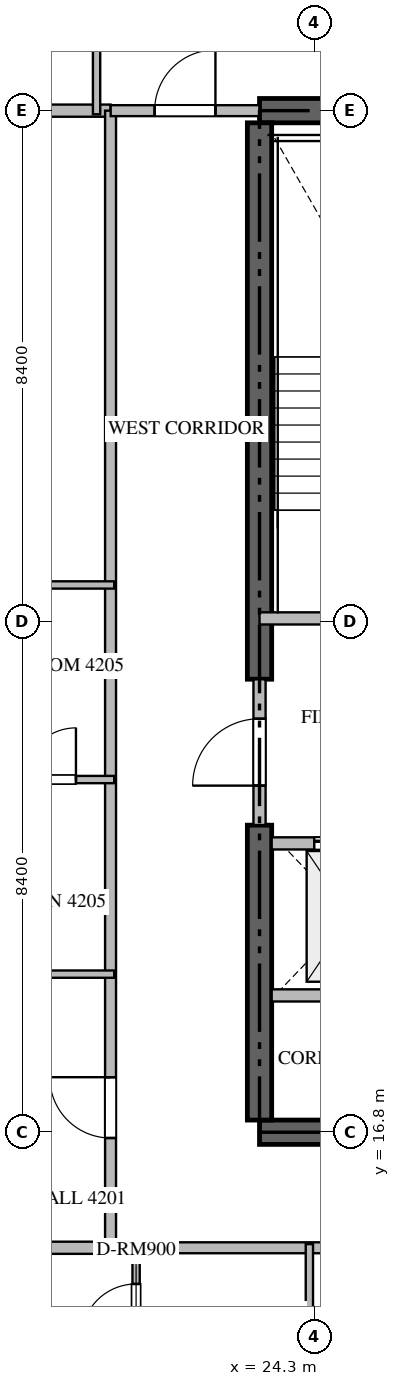
"""IFC4 building model, lengths in metres.
Left out: names, types, materials, properties, quantities, classifications, styles, units other than length and angle.
Written with IfcOpenShell. Run it as: python <this file> out.ifc"""

import sys

from ifc_helpers import new_model, si_unit, direction, frame, frame_2d, origin, place, context, subcontext, project, spatial, rectangle, extrude, source, transform, mapped, element, fill, save


model = new_model("IFC4")
c1 = context("Model", 3, precision=1e-05, world=origin(), true_north=direction((0.0, 1.0)))
c2 = subcontext(c1, "Body", "Model", "MODEL_VIEW")
j1 = project(units=[si_unit("LENGTHUNIT", "METRE"), si_unit("PLANEANGLEUNIT", "RADIAN")], contexts=[c1])
p1 = place(None, origin())
s1 = spatial("IfcSite", under=j1, at=p1, CompositionType="ELEMENT")
p2 = place(p1, origin())
s2 = spatial("IfcBuilding", under=s1, at=p2, CompositionType="ELEMENT")
p3 = place(p2, frame((0.0, 0.0, 168.9)))
s3 = spatial("IfcBuildingStorey", under=s2, at=p3, CompositionType="ELEMENT", Elevation=168.9)
for number, where, z_axis, x_axis in (
    (1, (23.4, 16.8, -0.26), (0.0, 0.0, 1.0), (1.0, 0.0, 0.0)),
    (2, (41.4, 33.6, -0.26), (0.0, 0.0, 1.0), (-1.0, 0.0, 0.0)),
):
    element("IfcWall", number, at=place(p3, frame(where, z_axis=z_axis, x_axis=x_axis)), inside=s3, PredefinedType="SHEAR", context=c2, shape_type="SweptSolid", body=[
        extrude(rectangle(XDim=18.0, YDim=0.4, at=frame_2d((9.0, 0.0))), origin(), (0.0, 0.0, 1.0), 3.748),
    ])
p4 = place(p3, frame((23.4, 17.0, -0.26), z_axis=(0.0, 0.0, 1.0), x_axis=(0.0, 1.0, 0.0)))
e3 = element("IfcWall", 3, at=p4, inside=s3, PredefinedType="SHEAR", context=c2, shape_type="SweptSolid", body=[
    extrude(rectangle(XDim=4.85, YDim=0.4, at=frame_2d((2.425, 0.0))), origin(), (0.0, 0.0, 1.0), 3.748),
])
p5 = place(p3, frame((23.4, 24.25, -0.26), z_axis=(0.0, 0.0, 1.0), x_axis=(0.0, 1.0, 0.0)))
e4 = element("IfcWall", 4, at=p5, inside=s3, PredefinedType="SHEAR", context=c2, shape_type="SweptSolid", body=[
    extrude(rectangle(XDim=9.15, YDim=0.4, at=frame_2d((4.575, 0.0))), origin(), (0.0, 0.0, 1.0), 3.748),
])
p6 = place(p3, frame((23.4, 25.25, 0.0), z_axis=(0.0, 0.0, 1.0), x_axis=(1.0, 0.0, 0.0)))
e5 = element("IfcWall", 5, at=p6, inside=s3, PredefinedType="STANDARD", context=c2, shape_type="SweptSolid", body=[
    extrude(rectangle(XDim=4.45, YDim=0.2, at=frame_2d((2.225, 0.0))), origin(), (0.0, 0.0, 1.0), 3.49),
])
p7 = place(p6, frame((1.65, 0.0, 0.0)))
e6 = element("IfcOpeningElement", 6, at=p7, cuts=e5, PredefinedType="OPENING", context=c2, shape_type="SweptSolid", body=[
    extrude(rectangle(XDim=1.1, YDim=2.15, at=frame_2d((0.55, 1.075))), frame((0.0, 0.11, 0.0), z_axis=(0.0, -1.0, 0.0), x_axis=(1.0, 0.0, 0.0)), (0.0, 0.0, 1.0), 0.22),
])
p8 = place(p3, frame((23.6, 21.55, 0.0), z_axis=(0.0, 0.0, 1.0), x_axis=(1.0, 0.0, 0.0)))
e7 = element("IfcWall", 7, at=p8, inside=s3, PredefinedType="STANDARD", context=c2, shape_type="SweptSolid", body=[
    extrude(rectangle(XDim=2.45, YDim=0.2, at=frame_2d((1.225, 0.0))), origin(), (0.0, 0.0, 1.0), 3.49),
])
p9 = place(p8, frame((0.7, 0.0, 0.0)))
e8 = element("IfcOpeningElement", 8, at=p9, cuts=e7, PredefinedType="OPENING", context=c2, shape_type="SweptSolid", body=[
    extrude(rectangle(XDim=1.2, YDim=2.2, at=frame_2d((0.6, 1.1))), frame((0.0, 0.11, 0.0), z_axis=(0.0, -1.0, 0.0), x_axis=(1.0, 0.0, 0.0)), (0.0, 0.0, 1.0), 0.22),
])
p10 = place(p3, frame((23.6, 19.05, 0.0), z_axis=(0.0, 0.0, 1.0), x_axis=(1.0, 0.0, 0.0)))
e9 = element("IfcWall", 9, at=p10, inside=s3, PredefinedType="STANDARD", context=c2, shape_type="SweptSolid", body=[
    extrude(rectangle(XDim=2.45, YDim=0.2, at=frame_2d((1.225, 0.0))), origin(), (0.0, 0.0, 1.0), 3.49),
])
p11 = place(p3, frame((23.4, 21.852, 0.0), z_axis=(0.0, 0.0, 1.0), x_axis=(0.0, 1.0, 0.0)))
e10 = element("IfcWall", 10, at=p11, inside=s3, PredefinedType="STANDARD", context=c2, shape_type="SweptSolid", body=[
    extrude(rectangle(XDim=2.396, YDim=0.2, at=frame_2d((1.198, 0.0))), origin(), (0.0, 0.0, 1.0), 3.49),
])
p12 = place(p11, frame((0.648, 0.0, 0.0)))
e11 = element("IfcOpeningElement", 11, at=p12, cuts=e10, PredefinedType="OPENING", context=c2, shape_type="SweptSolid", body=[
    extrude(rectangle(XDim=1.1, YDim=2.15, at=frame_2d((0.55, 1.075))), frame((0.0, 0.11, 0.0), z_axis=(0.0, -1.0, 0.0), x_axis=(1.0, 0.0, 0.0)), (0.0, 0.0, 1.0), 0.22),
])
for number, where, z_axis, x_axis in (
    (12, (7.882, 14.9, 0.0), (0.0, 0.0, 1.0), (1.0, 0.0, 0.0)),
    (13, (7.882, 33.6, 0.0), (0.0, 0.0, 1.0), (1.0, 0.0, 0.0)),
):
    element("IfcWall", number, at=place(p3, frame(where, z_axis=z_axis, x_axis=x_axis)), inside=s3, PredefinedType="PARTITIONING", context=c2, shape_type="SweptSolid", body=[
        extrude(rectangle(XDim=13.068, YDim=0.2, at=frame_2d((6.534, 0.0))), origin(), (0.0, 0.0, 1.0), 3.49),
    ])
p13 = place(p3, frame((20.952, 14.9, 0.0), z_axis=(0.0, 0.0, 1.0), x_axis=(1.0, 0.0, 0.0)))
e14 = element("IfcWall", 14, at=p13, inside=s3, PredefinedType="PARTITIONING", context=c2, shape_type="SweptSolid", body=[
    extrude(rectangle(XDim=22.896, YDim=0.18, at=frame_2d((11.448, 0.0))), origin(), (0.0, 0.0, 1.0), 3.49),
])
p14 = place(p13, frame((5.452, 0.0, 0.0)))
e15 = element("IfcOpeningElement", 15, at=p14, cuts=e14, PredefinedType="OPENING", context=c2, shape_type="SweptSolid", body=[
    extrude(rectangle(XDim=1.0, YDim=2.15, at=frame_2d((0.5, 1.075))), frame((0.0, 0.1, 0.0), z_axis=(0.0, -1.0, 0.0), x_axis=(1.0, 0.0, 0.0)), (0.0, 0.0, 1.0), 0.2),
])
p15 = place(p13, frame((19.378, 0.0, 0.0)))
e16 = element("IfcOpeningElement", 16, at=p15, cuts=e14, PredefinedType="OPENING", context=c2, shape_type="SweptSolid", body=[
    extrude(rectangle(XDim=1.0, YDim=2.15, at=frame_2d((0.5, 1.075))), frame((0.0, 0.1, 0.0), z_axis=(0.0, -1.0, 0.0), x_axis=(1.0, 0.0, 0.0)), (0.0, 0.0, 1.0), 0.2),
])
p16 = place(p3, frame((20.95, 14.9, 0.0), z_axis=(0.0, 0.0, 1.0), x_axis=(0.0, 1.0, 0.0)))
e17 = element("IfcWall", 17, at=p16, inside=s3, PredefinedType="PARTITIONING", context=c2, shape_type="SweptSolid", body=[
    extrude(rectangle(XDim=18.7, YDim=0.18, at=frame_2d((9.35, 0.0))), origin(), (0.0, 0.0, 1.0), 3.49),
])
p17 = place(p16, frame((1.805, 0.0, 0.0)))
e18 = element("IfcOpeningElement", 18, at=p17, cuts=e17, PredefinedType="OPENING", context=c2, shape_type="SweptSolid", body=[
    extrude(rectangle(XDim=1.0, YDim=2.15, at=frame_2d((0.5, 1.075))), frame((0.0, 0.1, 0.0), z_axis=(0.0, -1.0, 0.0), x_axis=(1.0, 0.0, 0.0)), (0.0, 0.0, 1.0), 0.2),
])
p18 = place(p3, frame((20.952, 33.6, 0.0), z_axis=(0.0, 0.0, 1.0), x_axis=(1.0, 0.0, 0.0)))
e19 = element("IfcWall", 19, at=p18, inside=s3, PredefinedType="PARTITIONING", context=c2, shape_type="SweptSolid", body=[
    extrude(rectangle(XDim=2.446, YDim=0.18, at=frame_2d((1.223, 0.0))), origin(), (0.0, 0.0, 1.0), 3.49),
])
p19 = place(p18, frame((0.723, 0.0, 0.0)))
e20 = element("IfcOpeningElement", 20, at=p19, cuts=e19, PredefinedType="OPENING", context=c2, shape_type="SweptSolid", body=[
    extrude(rectangle(XDim=1.0, YDim=2.15, at=frame_2d((0.5, 1.075))), frame((0.0, 0.1, 0.0), z_axis=(0.0, -1.0, 0.0), x_axis=(1.0, 0.0, 0.0)), (0.0, 0.0, 1.0), 0.2),
])
p20 = place(p3, frame((24.22, 12.15, 0.0), z_axis=(0.0, 0.0, 1.0), x_axis=(0.0, 1.0, 0.0)))
e21 = element("IfcWall", 21, at=p20, inside=s3, PredefinedType="PARTITIONING", context=c2, shape_type="SweptSolid", body=[
    extrude(rectangle(XDim=2.81, YDim=0.12, at=frame_2d((1.405, 0.0))), origin(), (0.0, 0.0, 1.0), 3.49),
])
p21 = place(p3, frame((21.37, 12.75, 0.0), z_axis=(0.0, 0.0, 1.0), x_axis=(0.0, 1.0, 0.0)))
e22 = element("IfcWall", 22, at=p21, inside=s3, PredefinedType="PARTITIONING", context=c2, shape_type="SweptSolid", body=[
    extrude(rectangle(XDim=2.21, YDim=0.12, at=frame_2d((1.105, 0.0))), origin(), (0.0, 0.0, 1.0), 3.49),
])
p22 = place(p21, frame((0.655, 0.0, 0.0)))
e23 = element("IfcOpeningElement", 23, at=p22, cuts=e22, PredefinedType="OPENING", context=c2, shape_type="SweptSolid", body=[
    extrude(rectangle(XDim=0.9, YDim=2.1, at=frame_2d((0.45, 1.05))), frame((0.0, 0.07, 0.0), z_axis=(0.0, -1.0, 0.0), x_axis=(1.0, 0.0, 0.0)), (0.0, 0.0, 1.0), 0.14),
])
for number, where, z_axis, x_axis in (
    (24, (20.72, 36.35, 0.0), (0.0, 0.0, 1.0), (0.0, -1.0, 0.0)),
    (25, (18.2, 19.4, 0.0), (0.0, 0.0, 1.0), (1.0, 0.0, 0.0)),
):
    element("IfcWall", number, at=place(p3, frame(where, z_axis=z_axis, x_axis=x_axis)), inside=s3, PredefinedType="PARTITIONING", context=c2, shape_type="SweptSolid", body=[
        extrude(rectangle(XDim=2.81, YDim=0.12, at=frame_2d((1.405, 0.0))), origin(), (0.0, 0.0, 1.0), 3.49),
    ])
p23 = place(p3, frame((18.9, 25.8, 0.0), z_axis=(0.0, 0.0, 1.0), x_axis=(1.0, 0.0, 0.0)))
e26 = element("IfcWall", 26, at=p23, inside=s3, PredefinedType="PARTITIONING", context=c2, shape_type="SweptSolid", body=[
    extrude(rectangle(XDim=2.11, YDim=0.12, at=frame_2d((1.055, 0.0))), origin(), (0.0, 0.0, 1.0), 3.49),
])
p24 = place(p3, frame((18.902, 22.6, 0.0), z_axis=(0.0, 0.0, 1.0), x_axis=(1.0, 0.0, 0.0)))
e27 = element("IfcWall", 27, at=p24, inside=s3, PredefinedType="PARTITIONING", context=c2, shape_type="SweptSolid", body=[
    extrude(rectangle(XDim=2.108, YDim=0.12, at=frame_2d((1.054, 0.0))), origin(), (0.0, 0.0, 1.0), 3.49),
])
p25 = place(p24, frame((0.629, 0.0, 0.0)))
e28 = element("IfcOpeningElement", 28, at=p25, cuts=e27, PredefinedType="OPENING", context=c2, shape_type="SweptSolid", body=[
    extrude(rectangle(XDim=0.85, YDim=2.1, at=frame_2d((0.425, 1.05))), frame((0.0, 0.07, 0.0), z_axis=(0.0, -1.0, 0.0), x_axis=(1.0, 0.0, 0.0)), (0.0, 0.0, 1.0), 0.14),
])
m1 = source(origin(), c2, "Body", "SweptSolid", [
    extrude(rectangle(XDim=1.2, YDim=2.2, at=frame_2d((0.6, 1.1))), frame((0.0, 0.025, 0.0), z_axis=(0.0, -1.0, 0.0), x_axis=(1.0, 0.0, 0.0)), (0.0, 0.0, 1.0), 0.05),
])
p26 = place(p9, origin())
e29 = element("IfcDoor", 29, at=p26, inside=s3, OperationType="DOUBLE_DOOR_SLIDING", PredefinedType="DOOR", context=c2, shape_type="MappedRepresentation", body=[
    mapped(m1, transform((0.0, 0.0, 0.0), scale=1.0)),
])
fill(e8, e29)
m2 = source(origin(), c2, "Body", "SweptSolid", [
    extrude(rectangle(XDim=1.1, YDim=2.15, at=frame_2d((0.55, 1.075))), frame((0.0, 0.025, 0.0), z_axis=(0.0, -1.0, 0.0), x_axis=(1.0, 0.0, 0.0)), (0.0, 0.0, 1.0), 0.05),
])
p27 = place(p12, origin())
e30 = element("IfcDoor", 30, at=p27, inside=s3, OperationType="SINGLE_SWING_LEFT", PredefinedType="DOOR", context=c2, shape_type="MappedRepresentation", body=[
    mapped(m2, transform((0.0, 0.0, 0.0), scale=1.0)),
])
fill(e11, e30)
m3 = source(origin(), c2, "Body", "SweptSolid", [
    extrude(rectangle(XDim=1.0, YDim=2.15, at=frame_2d((0.5, 1.075))), frame((0.0, 0.025, 0.0), z_axis=(0.0, -1.0, 0.0), x_axis=(1.0, 0.0, 0.0)), (0.0, 0.0, 1.0), 0.05),
])
p28 = place(p17, origin())
e31 = element("IfcDoor", 31, at=p28, inside=s3, OperationType="SINGLE_SWING_RIGHT", PredefinedType="DOOR", context=c2, shape_type="MappedRepresentation", body=[
    mapped(m3, transform((0.0, 0.0, 0.0), scale=1.0)),
])
fill(e18, e31)
p29 = place(p19, origin())
e32 = element("IfcDoor", 32, at=p29, inside=s3, OperationType="SINGLE_SWING_RIGHT", PredefinedType="DOOR", context=c2, shape_type="MappedRepresentation", body=[
    mapped(m3, transform((0.0, 0.0, 0.0), scale=1.0)),
])
fill(e20, e32)
m4 = source(origin(), c2, "Body", "SweptSolid", [
    extrude(rectangle(XDim=0.9, YDim=2.1, at=frame_2d((0.45, 1.05))), frame((0.0, 0.025, 0.0), z_axis=(0.0, -1.0, 0.0), x_axis=(1.0, 0.0, 0.0)), (0.0, 0.0, 1.0), 0.05),
])
p30 = place(p22, origin())
e33 = element("IfcDoor", 33, at=p30, inside=s3, OperationType="SINGLE_SWING_LEFT", PredefinedType="DOOR", context=c2, shape_type="MappedRepresentation", body=[
    mapped(m4, transform((0.0, 0.0, 0.0), scale=1.0)),
])
fill(e23, e33)
m5 = source(origin(), c2, "Body", "SweptSolid", [
    extrude(rectangle(XDim=0.85, YDim=2.1, at=frame_2d((0.425, 1.05))), frame((0.0, 0.025, 0.0), z_axis=(0.0, -1.0, 0.0), x_axis=(1.0, 0.0, 0.0)), (0.0, 0.0, 1.0), 0.05),
])
p31 = place(p25, origin())
e34 = element("IfcDoor", 34, at=p31, inside=s3, OperationType="SINGLE_SWING_RIGHT", PredefinedType="DOOR", context=c2, shape_type="MappedRepresentation", body=[
    mapped(m5, transform((0.0, 0.0, 0.0), scale=1.0)),
])
fill(e28, e34)
save(model, sys.argv[1])
